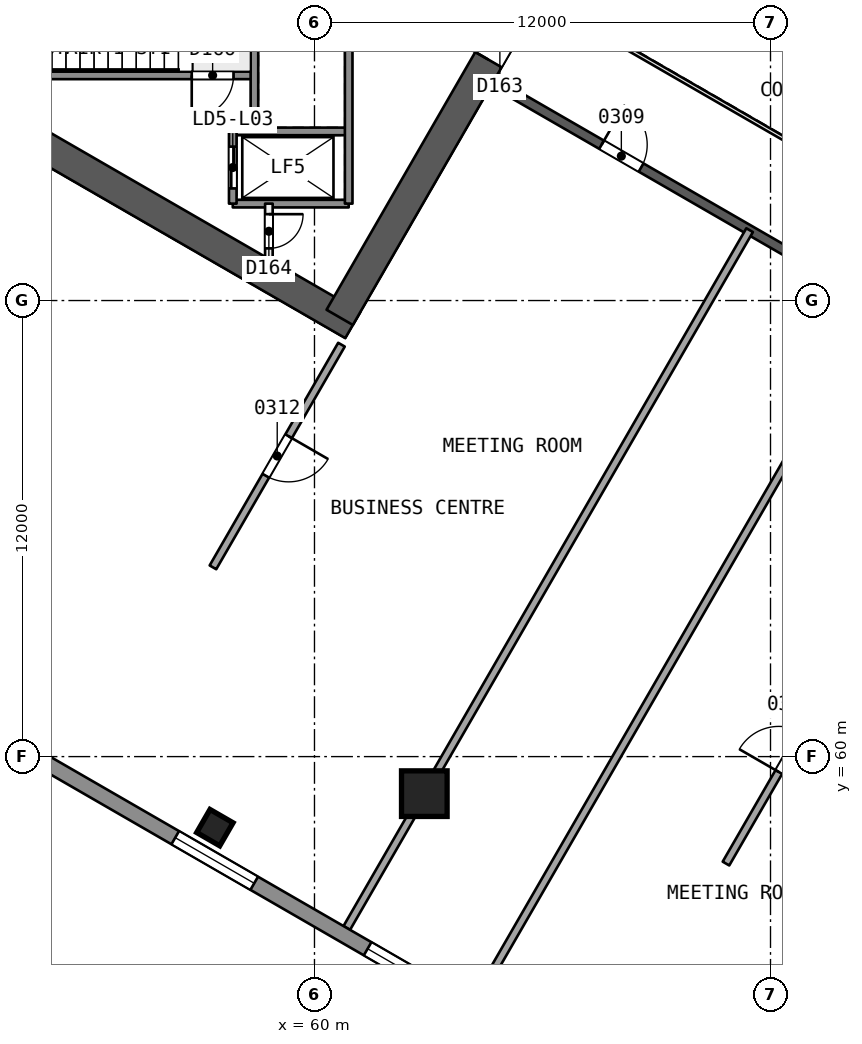
"""IFC4 building model, lengths in metres.
Left out: names, types, materials, properties, quantities, classifications, styles, units other than length and angle.
Written with IfcOpenShell. Run it as: python <this file> out.ifc"""

import sys

from ifc_helpers import new_model, si_unit, direction, frame, frame_2d, origin, origin_2d, place, context, subcontext, project, spatial, rectangle, extrude, element, fill, save


model = new_model("IFC4")
c1 = context("Model", 3, precision=1e-05, world=origin(), true_north=direction((0.0, 1.0)))
c2 = subcontext(c1, "Body", "Model", "MODEL_VIEW")
j1 = project(units=[si_unit("LENGTHUNIT", "METRE"), si_unit("PLANEANGLEUNIT", "RADIAN")], contexts=[c1])
p1 = place(None, origin())
s1 = spatial("IfcSite", under=j1, at=p1, CompositionType="ELEMENT")
p2 = place(p1, origin())
s2 = spatial("IfcBuilding", under=s1, at=p2, CompositionType="ELEMENT")
p3 = place(p2, frame((0.0, 0.0, 20.4)))
s3 = spatial("IfcBuildingStorey", under=s2, at=p3, CompositionType="ELEMENT", Elevation=20.4)
p4 = place(p3, frame((48.797, 78.408, 0.0), z_axis=(0.0, 0.0, 1.0), x_axis=(0.866032504327, -0.499987701298, 0.0)))
e1 = element("IfcWall", 1, at=p4, inside=s3, PredefinedType="SHEAR", context=c2, shape_type="SweptSolid", body=[
    extrude(rectangle(XDim=14.102, YDim=0.8, at=frame_2d((7.051, 0.0))), origin(), (0.0, 0.0, 1.0), 5.0),
])
p5 = place(p3, frame((60.664, 71.557, 0.0), z_axis=(0.0, 0.0, 1.0), x_axis=(0.50000409368, 0.866023040284, 0.0)))
e2 = element("IfcWall", 2, at=p5, inside=s3, PredefinedType="SHEAR", context=c2, shape_type="SweptSolid", body=[
    extrude(rectangle(XDim=9.98, YDim=0.8, at=frame_2d((4.99, 0.0))), origin(), (0.0, 0.0, 1.0), 5.0),
])
p6 = place(p5, frame((7.83, 0.0, 0.0)))
e3 = element("IfcOpeningElement", 3, at=p6, cuts=e2, PredefinedType="OPENING", context=c2, shape_type="SweptSolid", body=[
    extrude(rectangle(XDim=1.2, YDim=2.1, at=frame_2d((0.6, 1.05))), frame((0.0, 0.411, 0.0), z_axis=(0.0, -1.0, 0.0), x_axis=(1.0, 0.0, 0.0)), (0.0, 0.0, 1.0), 0.821),
])
p7 = place(p3, frame((64.7, 77.748, 0.0), z_axis=(0.0, 0.0, 1.0), x_axis=(0.866026492143, -0.499998114903, 0.0)))
e4 = element("IfcWall", 4, at=p7, inside=s3, PredefinedType="SHEAR", context=c2, shape_type="SweptSolid", body=[
    extrude(rectangle(XDim=15.588, YDim=0.25, at=frame_2d((7.794, 0.0))), origin(), (0.0, 0.0, 1.0), 4.5),
])
p8 = place(p7, frame((3.297, 0.0, 0.0)))
e5 = element("IfcOpeningElement", 5, at=p8, cuts=e4, PredefinedType="OPENING", context=c2, shape_type="SweptSolid", body=[
    extrude(rectangle(XDim=1.2, YDim=2.4, at=frame_2d((0.6, 1.2))), frame((0.0, 0.135, 0.0), z_axis=(0.0, -1.0, 0.0), x_axis=(1.0, 0.0, 0.0)), (0.0, 0.0, 1.0), 0.271),
])
p9 = place(p7, frame((9.143, 0.0, 0.0)))
e6 = element("IfcOpeningElement", 6, at=p9, cuts=e4, PredefinedType="OPENING", context=c2, shape_type="SweptSolid", body=[
    extrude(rectangle(XDim=1.2, YDim=2.4, at=frame_2d((0.6, 1.2))), frame((0.0, 0.135, 0.0), z_axis=(0.0, -1.0, 0.0), x_axis=(1.0, 0.0, 0.0)), (0.0, 0.0, 1.0), 0.271),
])
p10 = place(p7, frame((13.04, 0.0, 0.0)))
e7 = element("IfcOpeningElement", 7, at=p10, cuts=e4, PredefinedType="OPENING", context=c2, shape_type="SweptSolid", body=[
    extrude(rectangle(XDim=1.2, YDim=2.4, at=frame_2d((0.6, 1.2))), frame((0.0, 0.135, 0.0), z_axis=(0.0, -1.0, 0.0), x_axis=(1.0, 0.0, 0.0)), (0.0, 0.0, 1.0), 0.271),
])
p11 = place(p3, frame((62.878, 59.004, 0.0), z_axis=(0.010056548747, 0.017476914813, 0.999796690971), x_axis=(-0.498646620807, -0.866570811206, 0.020163747768)))
e8 = element("IfcColumn", 8, at=p11, inside=s3, PredefinedType="COLUMN", context=c2, shape_type="SweptSolid", body=[
    extrude(rectangle(XDim=1.2, YDim=1.2, at=origin_2d()), origin(), (0.0, 0.0, 1.0), 5.001),
])
p12 = place(p3, frame((57.379, 58.131, 0.0), z_axis=(0.0, 0.0, 1.0), x_axis=(0.5, 0.866025403784, 0.0)))
e9 = element("IfcColumn", 9, at=p12, inside=s3, PredefinedType="COLUMN", context=c2, shape_type="SweptSolid", body=[
    extrude(rectangle(XDim=0.7, YDim=0.7, at=origin_2d()), origin(), (0.0, 0.0, 1.0), 5.0),
])
p13 = place(p3, frame((60.85, 55.491, 0.0), z_axis=(0.0, 0.0, 1.0), x_axis=(0.499994584841, 0.866028530205, 0.0)))
e10 = element("IfcWall", 10, at=p13, inside=s3, PredefinedType="PARTITIONING", context=c2, shape_type="SweptSolid", body=[
    extrude(rectangle(XDim=21.201, YDim=0.2, at=frame_2d((10.601, 0.0))), origin(), (0.0, 0.0, 1.0), 4.5),
])
p14 = place(p3, frame((60.71, 70.838, 0.0), z_axis=(0.0, 0.0, 1.0), x_axis=(-0.499981745636, -0.86603594269, 0.0)))
e11 = element("IfcWall", 11, at=p14, inside=s3, PredefinedType="PARTITIONING", context=c2, shape_type="SweptSolid", body=[
    extrude(rectangle(XDim=6.765, YDim=0.2, at=frame_2d((3.382, 0.0))), origin(), (0.0, 0.0, 1.0), 4.5),
])
p15 = place(p14, frame((2.782, 0.0, 0.0)))
e12 = element("IfcOpeningElement", 12, at=p15, cuts=e11, PredefinedType="OPENING", context=c2, shape_type="SweptSolid", body=[
    extrude(rectangle(XDim=1.2, YDim=2.4, at=frame_2d((0.6, 1.2))), frame((0.0, 0.11, 0.0), z_axis=(0.0, -1.0, 0.0), x_axis=(1.0, 0.0, 0.0)), (0.0, 0.0, 1.0), 0.221),
])
p16 = place(p3, frame((64.225, 53.542, 0.0), z_axis=(0.0, 0.0, 1.0), x_axis=(0.499994584841, 0.866028530205, 0.0)))
e13 = element("IfcWall", 13, at=p16, inside=s3, PredefinedType="PARTITIONING", context=c2, shape_type="SweptSolid", body=[
    extrude(rectangle(XDim=21.201, YDim=0.2, at=frame_2d((10.601, 0.0))), origin(), (0.0, 0.0, 1.0), 4.5),
])
p17 = place(p3, frame((70.828, 57.186, 0.0), z_axis=(0.0, 0.0, 1.0), x_axis=(0.499981745636, 0.86603594269, 0.0)))
e14 = element("IfcWall", 14, at=p17, inside=s3, PredefinedType="PARTITIONING", context=c2, shape_type="SweptSolid", body=[
    extrude(rectangle(XDim=6.765, YDim=0.2, at=frame_2d((3.382, 0.0))), origin(), (0.0, 0.0, 1.0), 4.5),
])
p18 = place(p17, frame((2.782, 0.0, 0.0)))
e15 = element("IfcOpeningElement", 15, at=p18, cuts=e14, PredefinedType="OPENING", context=c2, shape_type="SweptSolid", body=[
    extrude(rectangle(XDim=1.2, YDim=2.4, at=frame_2d((0.6, 1.2))), frame((0.0, 0.11, 0.0), z_axis=(0.0, -1.0, 0.0), x_axis=(1.0, 0.0, 0.0)), (0.0, 0.0, 1.0), 0.221),
])
p19 = place(p3, frame((94.84, 35.636, 0.0), z_axis=(0.0, 0.0, 1.0), x_axis=(-0.866025599265, 0.499999661418, 0.0)))
e16 = element("IfcWall", 16, at=p19, inside=s3, PredefinedType="SOLIDWALL", context=c2, shape_type="SweptSolid", body=[
    extrude(rectangle(XDim=78.727, YDim=0.4, at=frame_2d((39.364, 0.0))), origin(), (0.0, 0.0, 1.0), 4.5),
])
p20 = place(p19, frame((42.061, 0.0, 0.9)))
e17 = element("IfcOpeningElement", 17, at=p20, cuts=e16, PredefinedType="OPENING", context=c2, shape_type="SweptSolid", body=[
    extrude(rectangle(XDim=2.4, YDim=2.4, at=frame_2d((1.2, 1.2))), frame((0.0, 0.21, 0.0), z_axis=(0.0, -1.0, 0.0), x_axis=(1.0, 0.0, 0.0)), (0.0, 0.0, 1.0), 0.421),
])
p21 = place(p19, frame((36.215, 0.0, 0.9)))
e18 = element("IfcOpeningElement", 18, at=p21, cuts=e16, PredefinedType="OPENING", context=c2, shape_type="SweptSolid", body=[
    extrude(rectangle(XDim=2.4, YDim=2.4, at=frame_2d((1.2, 1.2))), frame((0.0, 0.21, 0.0), z_axis=(0.0, -1.0, 0.0), x_axis=(1.0, 0.0, 0.0)), (0.0, 0.0, 1.0), 0.421),
])
p22 = place(p19, frame((32.318, 0.0, 0.9)))
e19 = element("IfcOpeningElement", 19, at=p22, cuts=e16, PredefinedType="OPENING", context=c2, shape_type="SweptSolid", body=[
    extrude(rectangle(XDim=2.4, YDim=2.4, at=frame_2d((1.2, 1.2))), frame((0.0, 0.21, 0.0), z_axis=(0.0, -1.0, 0.0), x_axis=(1.0, 0.0, 0.0)), (0.0, 0.0, 1.0), 0.421),
])
p23 = place(p3, frame((58.42, 77.925, 0.0), z_axis=(0.0, 0.0, 1.0), x_axis=(-1.0, 0.0, 0.0)))
e20 = element("IfcWall", 20, at=p23, inside=s3, PredefinedType="SOLIDWALL", context=c2, shape_type="SweptSolid", body=[
    extrude(rectangle(XDim=7.7, YDim=0.2, at=frame_2d((3.85, 0.0))), origin(), (0.0, 0.0, 1.0), 4.5),
])
p24 = place(p23, frame((0.55, 0.0, 0.0)))
e21 = element("IfcOpeningElement", 21, at=p24, cuts=e20, PredefinedType="OPENING", context=c2, shape_type="SweptSolid", body=[
    extrude(rectangle(XDim=1.1, YDim=2.1, at=frame_2d((0.55, 1.05))), frame((0.0, 0.11, 0.0), z_axis=(0.0, -1.0, 0.0), x_axis=(1.0, 0.0, 0.0)), (0.0, 0.0, 1.0), 0.221),
])
for number, where, z_axis, x_axis in (
    (22, (60.9, 76.45, 0.0), (0.0, 0.0, 1.0), (-1.0, 0.0, 0.0)),
    (23, (60.9, 74.55, 0.0), (0.0, 0.0, 1.0), (-1.0, 0.0, 0.0)),
):
    element("IfcWall", number, at=place(p3, frame(where, z_axis=z_axis, x_axis=x_axis)), inside=s3, PredefinedType="SOLIDWALL", context=c2, shape_type="SweptSolid", body=[
        extrude(rectangle(XDim=3.05, YDim=0.2, at=frame_2d((1.525, 0.0))), origin(), (0.0, 0.0, 1.0), 4.5),
    ])
p25 = place(p3, frame((60.9, 85.45, 0.0), z_axis=(0.0, 0.0, 1.0), x_axis=(0.0, -1.0, 0.0)))
e24 = element("IfcWall", 24, at=p25, inside=s3, PredefinedType="SOLIDWALL", context=c2, shape_type="SweptSolid", body=[
    extrude(rectangle(XDim=10.9, YDim=0.2, at=frame_2d((5.45, 0.0))), origin(), (0.0, 0.0, 1.0), 4.5),
])
p26 = place(p3, frame((58.8, 74.55, 0.0), z_axis=(0.0, 0.0, 1.0), x_axis=(0.0, -1.0, 0.0)))
e25 = element("IfcWall", 25, at=p26, inside=s3, PredefinedType="PARTITIONING", context=c2, shape_type="SweptSolid", body=[
    extrude(rectangle(XDim=1.455, YDim=0.2, at=frame_2d((0.728, 0.0))), origin(), (0.0, 0.0, 1.0), 4.5),
])
p27 = place(p26, frame((0.278, 0.0, 0.0)))
e26 = element("IfcOpeningElement", 26, at=p27, cuts=e25, PredefinedType="OPENING", context=c2, shape_type="SweptSolid", body=[
    extrude(rectangle(XDim=0.9, YDim=2.1, at=frame_2d((0.45, 1.05))), frame((0.0, 0.11, 0.0), z_axis=(0.0, -1.0, 0.0), x_axis=(1.0, 0.0, 0.0)), (0.0, 0.0, 1.0), 0.221),
])
p28 = place(p3, frame((58.42, 85.45, 0.0), z_axis=(0.0, 0.0, 1.0), x_axis=(0.0, -1.0, 0.0)))
e27 = element("IfcWall", 27, at=p28, inside=s3, PredefinedType="SOLIDWALL", context=c2, shape_type="SweptSolid", body=[
    extrude(rectangle(XDim=9.0, YDim=0.2, at=frame_2d((4.5, 0.0))), origin(), (0.0, 0.0, 1.0), 4.5),
])
p29 = place(p3, frame((57.85, 76.45, 0.0), z_axis=(0.0, 0.0, 1.0), x_axis=(0.0, -1.0, 0.0)))
e28 = element("IfcWall", 28, at=p29, inside=s3, PredefinedType="SOLIDWALL", context=c2, shape_type="SweptSolid", body=[
    extrude(rectangle(XDim=1.9, YDim=0.2, at=frame_2d((0.95, 0.0))), origin(), (0.0, 0.0, 1.0), 4.5),
])
p30 = place(p29, frame((0.4, 0.0, 0.0)))
e29 = element("IfcOpeningElement", 29, at=p30, cuts=e28, PredefinedType="OPENING", context=c2, shape_type="SweptSolid", body=[
    extrude(rectangle(XDim=1.1, YDim=2.1, at=frame_2d((0.55, 1.05))), frame((0.0, 0.11, 0.0), z_axis=(0.0, -1.0, 0.0), x_axis=(1.0, 0.0, 0.0)), (0.0, 0.0, 1.0), 0.221),
])
p31 = place(p3, frame((67.702, 78.948, 0.0), z_axis=(0.0, 0.0, 1.0), x_axis=(0.866026658274, -0.499997827154, 0.0)))
e30 = element("IfcWall", 30, at=p31, inside=s3, PredefinedType="PARTITIONING", context=c2, shape_type="SweptSolid", body=[
    extrude(rectangle(XDim=11.588, YDim=0.1, at=frame_2d((5.794, 0.0))), origin(), (0.0, 0.0, 1.0), 4.5),
])
p32 = place(p8, origin())
e31 = element("IfcDoor", 31, at=p32, inside=s3, OperationType="SINGLE_SWING_LEFT", PredefinedType="NOTDEFINED", context=c2, shape_type="SweptSolid", body=[
    extrude(rectangle(XDim=1.2, YDim=2.4, at=frame_2d((0.6, 1.2))), frame((0.0, 0.025, 0.0), z_axis=(0.0, -1.0, 0.0), x_axis=(1.0, 0.0, 0.0)), (0.0, 0.0, 1.0), 0.05),
])
fill(e5, e31)
p33 = place(p15, origin())
e32 = element("IfcDoor", 32, at=p33, inside=s3, OperationType="SINGLE_SWING_LEFT", PredefinedType="NOTDEFINED", context=c2, shape_type="SweptSolid", body=[
    extrude(rectangle(XDim=1.2, YDim=2.4, at=frame_2d((0.6, 1.2))), frame((0.0, 0.025, 0.0), z_axis=(0.0, -1.0, 0.0), x_axis=(1.0, 0.0, 0.0)), (0.0, 0.0, 1.0), 0.05),
])
fill(e12, e32)
p34 = place(p18, origin())
e33 = element("IfcDoor", 33, at=p34, inside=s3, OperationType="SINGLE_SWING_LEFT", PredefinedType="NOTDEFINED", context=c2, shape_type="SweptSolid", body=[
    extrude(rectangle(XDim=1.2, YDim=2.4, at=frame_2d((0.6, 1.2))), frame((0.0, 0.025, 0.0), z_axis=(0.0, -1.0, 0.0), x_axis=(1.0, 0.0, 0.0)), (0.0, 0.0, 1.0), 0.05),
])
fill(e15, e33)
p35 = place(p20, origin())
e34 = element("IfcWindow", 34, at=p35, inside=s3, PartitioningType="SINGLE_PANEL", PredefinedType="WINDOW", context=c2, shape_type="SweptSolid", body=[
    extrude(rectangle(XDim=2.4, YDim=2.4, at=frame_2d((1.2, 1.2))), frame((0.0, 0.03, 0.0), z_axis=(0.0, -1.0, 0.0), x_axis=(1.0, 0.0, 0.0)), (0.0, 0.0, 1.0), 0.06),
])
fill(e17, e34)
p36 = place(p21, origin())
e35 = element("IfcWindow", 35, at=p36, inside=s3, PartitioningType="SINGLE_PANEL", PredefinedType="WINDOW", context=c2, shape_type="SweptSolid", body=[
    extrude(rectangle(XDim=2.4, YDim=2.4, at=frame_2d((1.2, 1.2))), frame((0.0, 0.03, 0.0), z_axis=(0.0, -1.0, 0.0), x_axis=(1.0, 0.0, 0.0)), (0.0, 0.0, 1.0), 0.06),
])
fill(e18, e35)
p37 = place(p6, origin())
e36 = element("IfcDoor", 36, at=p37, inside=s3, OperationType="SINGLE_SWING_LEFT", PredefinedType="NOTDEFINED", context=c2, shape_type="SweptSolid", body=[
    extrude(rectangle(XDim=1.2, YDim=2.1, at=frame_2d((0.6, 1.05))), frame((0.0, 0.025, 0.0), z_axis=(0.0, -1.0, 0.0), x_axis=(1.0, 0.0, 0.0)), (0.0, 0.0, 1.0), 0.05),
])
fill(e3, e36)
p38 = place(p30, origin())
e37 = element("IfcDoor", 37, at=p38, inside=s3, OperationType="SLIDING_TO_RIGHT", PredefinedType="NOTDEFINED", context=c2, shape_type="SweptSolid", body=[
    extrude(rectangle(XDim=1.1, YDim=2.1, at=frame_2d((0.55, 1.05))), frame((0.0, 0.025, 0.0), z_axis=(0.0, -1.0, 0.0), x_axis=(1.0, 0.0, 0.0)), (0.0, 0.0, 1.0), 0.05),
])
fill(e29, e37)
p39 = place(p27, origin())
e38 = element("IfcDoor", 38, at=p39, inside=s3, OperationType="SINGLE_SWING_LEFT", PredefinedType="NOTDEFINED", context=c2, shape_type="SweptSolid", body=[
    extrude(rectangle(XDim=0.9, YDim=2.1, at=frame_2d((0.45, 1.05))), frame((0.0, 0.025, 0.0), z_axis=(0.0, -1.0, 0.0), x_axis=(1.0, 0.0, 0.0)), (0.0, 0.0, 1.0), 0.05),
])
fill(e26, e38)
p40 = place(p24, origin())
e39 = element("IfcDoor", 39, at=p40, inside=s3, OperationType="SINGLE_SWING_RIGHT", PredefinedType="NOTDEFINED", context=c2, shape_type="SweptSolid", body=[
    extrude(rectangle(XDim=1.1, YDim=2.1, at=frame_2d((0.55, 1.05))), frame((0.0, 0.025, 0.0), z_axis=(0.0, -1.0, 0.0), x_axis=(1.0, 0.0, 0.0)), (0.0, 0.0, 1.0), 0.05),
])
fill(e21, e39)
save(model, sys.argv[1])
